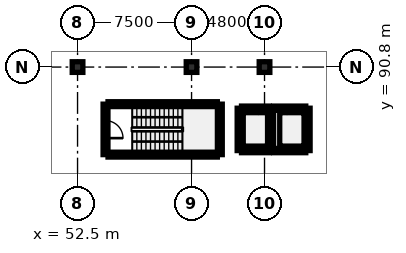
"""IFC4 building model, lengths in metres.
Left out: names, types, materials, properties, quantities, classifications, styles, units other than length and angle.
Written with IfcOpenShell. Run it as: python <this file> out.ifc"""

import sys

from ifc_helpers import new_model, si_unit, direction, frame, frame_2d, origin, origin_2d, place, context, subcontext, project, spatial, rectangle, extrude, element, fill, save


model = new_model("IFC4")
c1 = context("Model", 3, precision=1e-05, world=origin(), true_north=direction((0.0, 1.0)))
c2 = subcontext(c1, "Body", "Model", "MODEL_VIEW")
j1 = project(units=[si_unit("LENGTHUNIT", "METRE"), si_unit("PLANEANGLEUNIT", "RADIAN")], contexts=[c1])
p1 = place(None, origin())
s1 = spatial("IfcSite", under=j1, at=p1, CompositionType="ELEMENT")
p2 = place(p1, origin())
s2 = spatial("IfcBuilding", under=s1, at=p2, CompositionType="ELEMENT")
p3 = place(p2, frame((0.0, 0.0, -4.2)))
s3 = spatial("IfcBuildingStorey", under=s2, at=p3, CompositionType="ELEMENT", Elevation=-4.2)
for number, where, z_axis, x_axis in (
    (1, (52.5, 90.8, 0.0), (0.0, 0.0, 1.0), (1.0, 0.0, 0.0)),
    (2, (60.0, 90.8, 0.0), (0.0, 0.0, 1.0), (1.0, 0.0, 0.0)),
    (3, (64.8, 90.8, 0.0), (0.0, 0.0, 1.0), (1.0, 0.0, 0.0)),
):
    element("IfcColumn", number, at=place(p3, frame(where, z_axis=z_axis, x_axis=x_axis)), inside=s3, PredefinedType="COLUMN", context=c2, shape_type="SweptSolid", body=[
        extrude(rectangle(XDim=0.7, YDim=0.7, at=origin_2d()), origin(), (0.0, 0.0, 1.0), 3.78),
    ])
p4 = place(p3, frame((54.505, 85.04, 0.0), z_axis=(0.0, 0.0, 1.0), x_axis=(1.0, 0.0, 0.0)))
e4 = element("IfcWall", 4, at=p4, inside=s3, PredefinedType="SHEAR", context=c2, shape_type="SweptSolid", body=[
    extrude(rectangle(XDim=7.19, YDim=0.32, at=frame_2d((3.595, 0.0))), origin(), (0.0, 0.0, 1.0), 3.78),
])
p5 = place(p3, frame((61.86, 85.04, 0.0), z_axis=(0.0, 0.0, 1.0), x_axis=(0.0, 1.0, 0.0)))
e5 = element("IfcWall", 5, at=p5, inside=s3, PredefinedType="SHEAR", context=c2, shape_type="SweptSolid", body=[
    extrude(rectangle(XDim=3.32, YDim=0.32, at=frame_2d((1.66, 0.0))), origin(), (0.0, 0.0, 1.0), 3.78),
])
p6 = place(p3, frame((61.695, 88.36, 0.0), z_axis=(0.0, 0.0, 1.0), x_axis=(-1.0, 0.0, 0.0)))
e6 = element("IfcWall", 6, at=p6, inside=s3, PredefinedType="SHEAR", context=c2, shape_type="SweptSolid", body=[
    extrude(rectangle(XDim=7.19, YDim=0.32, at=frame_2d((3.595, 0.0))), origin(), (0.0, 0.0, 1.0), 3.78),
])
p7 = place(p3, frame((54.34, 88.36, 0.0), z_axis=(0.0, 0.0, 1.0), x_axis=(0.0, -1.0, 0.0)))
e7 = element("IfcWall", 7, at=p7, inside=s3, PredefinedType="SHEAR", context=c2, shape_type="SweptSolid", body=[
    extrude(rectangle(XDim=3.32, YDim=0.32, at=frame_2d((1.66, 0.0))), origin(), (0.0, 0.0, 1.0), 3.78),
])
p8 = place(p7, frame((1.085, 0.0, 0.0)))
e8 = element("IfcOpeningElement", 8, at=p8, cuts=e7, PredefinedType="OPENING", context=c2, shape_type="SweptSolid", body=[
    extrude(rectangle(XDim=1.15, YDim=2.15, at=frame_2d((0.575, 1.075))), frame((0.0, 0.172, 0.0), z_axis=(0.0, -1.0, 0.0), x_axis=(1.0, 0.0, 0.0)), (0.0, 0.0, 1.0), 0.344),
])
p9 = place(p3, frame((63.286, 85.307, 0.0), z_axis=(0.0, 0.0, 1.0), x_axis=(1.0, 0.0, 0.0)))
e9 = element("IfcWall", 9, at=p9, inside=s3, PredefinedType="SHEAR", context=c2, shape_type="SweptSolid", body=[
    extrude(rectangle(XDim=1.828, YDim=0.28, at=frame_2d((0.914, 0.0))), origin(), (0.0, 0.0, 1.0), 3.78),
])
p10 = place(p3, frame((65.259, 85.307, 0.0), z_axis=(0.0, 0.0, 1.0), x_axis=(0.0, 1.0, 0.0)))
e10 = element("IfcWall", 10, at=p10, inside=s3, PredefinedType="SHEAR", context=c2, shape_type="SweptSolid", body=[
    extrude(rectangle(XDim=2.787, YDim=0.28, at=frame_2d((1.393, 0.0))), origin(), (0.0, 0.0, 1.0), 3.78),
])
p11 = place(p3, frame((65.114, 88.093, 0.0), z_axis=(0.0, 0.0, 1.0), x_axis=(-1.0, 0.0, 0.0)))
e11 = element("IfcWall", 11, at=p11, inside=s3, PredefinedType="SHEAR", context=c2, shape_type="SweptSolid", body=[
    extrude(rectangle(XDim=1.828, YDim=0.28, at=frame_2d((0.914, 0.0))), origin(), (0.0, 0.0, 1.0), 3.78),
])
p12 = place(p11, frame((0.314, 0.0, 0.0)))
e12 = element("IfcOpeningElement", 12, at=p12, cuts=e11, PredefinedType="OPENING", context=c2, shape_type="SweptSolid", body=[
    extrude(rectangle(XDim=1.2, YDim=2.15, at=frame_2d((0.6, 1.075))), frame((0.0, 0.152, 0.0), z_axis=(0.0, -1.0, 0.0), x_axis=(1.0, 0.0, 0.0)), (0.0, 0.0, 1.0), 0.304),
])
p13 = place(p3, frame((63.141, 88.093, 0.0), z_axis=(0.0, 0.0, 1.0), x_axis=(0.0, -1.0, 0.0)))
e13 = element("IfcWall", 13, at=p13, inside=s3, PredefinedType="SHEAR", context=c2, shape_type="SweptSolid", body=[
    extrude(rectangle(XDim=2.787, YDim=0.28, at=frame_2d((1.393, 0.0))), origin(), (0.0, 0.0, 1.0), 3.78),
])
p14 = place(p3, frame((65.404, 85.307, 0.0), z_axis=(0.0, 0.0, 1.0), x_axis=(1.0, 0.0, 0.0)))
e14 = element("IfcWall", 14, at=p14, inside=s3, PredefinedType="SHEAR", context=c2, shape_type="SweptSolid", body=[
    extrude(rectangle(XDim=2.11, YDim=0.28, at=frame_2d((1.055, 0.0))), origin(), (0.0, 0.0, 1.0), 3.78),
])
p15 = place(p3, frame((67.659, 85.307, 0.0), z_axis=(0.0, 0.0, 1.0), x_axis=(0.0, 1.0, 0.0)))
e15 = element("IfcWall", 15, at=p15, inside=s3, PredefinedType="SHEAR", context=c2, shape_type="SweptSolid", body=[
    extrude(rectangle(XDim=2.787, YDim=0.28, at=frame_2d((1.393, 0.0))), origin(), (0.0, 0.0, 1.0), 3.78),
])
p16 = place(p3, frame((67.514, 88.093, 0.0), z_axis=(0.0, 0.0, 1.0), x_axis=(-1.0, 0.0, 0.0)))
e16 = element("IfcWall", 16, at=p16, inside=s3, PredefinedType="SHEAR", context=c2, shape_type="SweptSolid", body=[
    extrude(rectangle(XDim=2.11, YDim=0.28, at=frame_2d((1.055, 0.0))), origin(), (0.0, 0.0, 1.0), 3.78),
])
p17 = place(p16, frame((0.455, 0.0, 0.0)))
e17 = element("IfcOpeningElement", 17, at=p17, cuts=e16, PredefinedType="OPENING", context=c2, shape_type="SweptSolid", body=[
    extrude(rectangle(XDim=1.2, YDim=2.15, at=frame_2d((0.6, 1.075))), frame((0.0, 0.152, 0.0), z_axis=(0.0, -1.0, 0.0), x_axis=(1.0, 0.0, 0.0)), (0.0, 0.0, 1.0), 0.304),
])
p18 = place(p8, origin())
e18 = element("IfcDoor", 18, at=p18, inside=s3, OperationType="SINGLE_SWING_RIGHT", PredefinedType="DOOR", context=c2, shape_type="SweptSolid", body=[
    extrude(rectangle(XDim=1.15, YDim=2.15, at=frame_2d((0.575, 1.075))), frame((0.0, 0.025, 0.0), z_axis=(0.0, -1.0, 0.0), x_axis=(1.0, 0.0, 0.0)), (0.0, 0.0, 1.0), 0.05),
])
fill(e8, e18)
p19 = place(p12, origin())
e19 = element("IfcDoor", 19, at=p19, inside=s3, OperationType="SLIDING_TO_LEFT", PredefinedType="DOOR", context=c2, shape_type="SweptSolid", body=[
    extrude(rectangle(XDim=1.2, YDim=2.15, at=frame_2d((0.6, 1.075))), frame((0.0, 0.025, 0.0), z_axis=(0.0, -1.0, 0.0), x_axis=(1.0, 0.0, 0.0)), (0.0, 0.0, 1.0), 0.05),
])
fill(e12, e19)
p20 = place(p17, origin())
e20 = element("IfcDoor", 20, at=p20, inside=s3, OperationType="SLIDING_TO_RIGHT", PredefinedType="DOOR", context=c2, shape_type="SweptSolid", body=[
    extrude(rectangle(XDim=1.2, YDim=2.15, at=frame_2d((0.6, 1.075))), frame((0.0, 0.025, 0.0), z_axis=(0.0, -1.0, 0.0), x_axis=(1.0, 0.0, 0.0)), (0.0, 0.0, 1.0), 0.05),
])
fill(e17, e20)
save(model, sys.argv[1])
